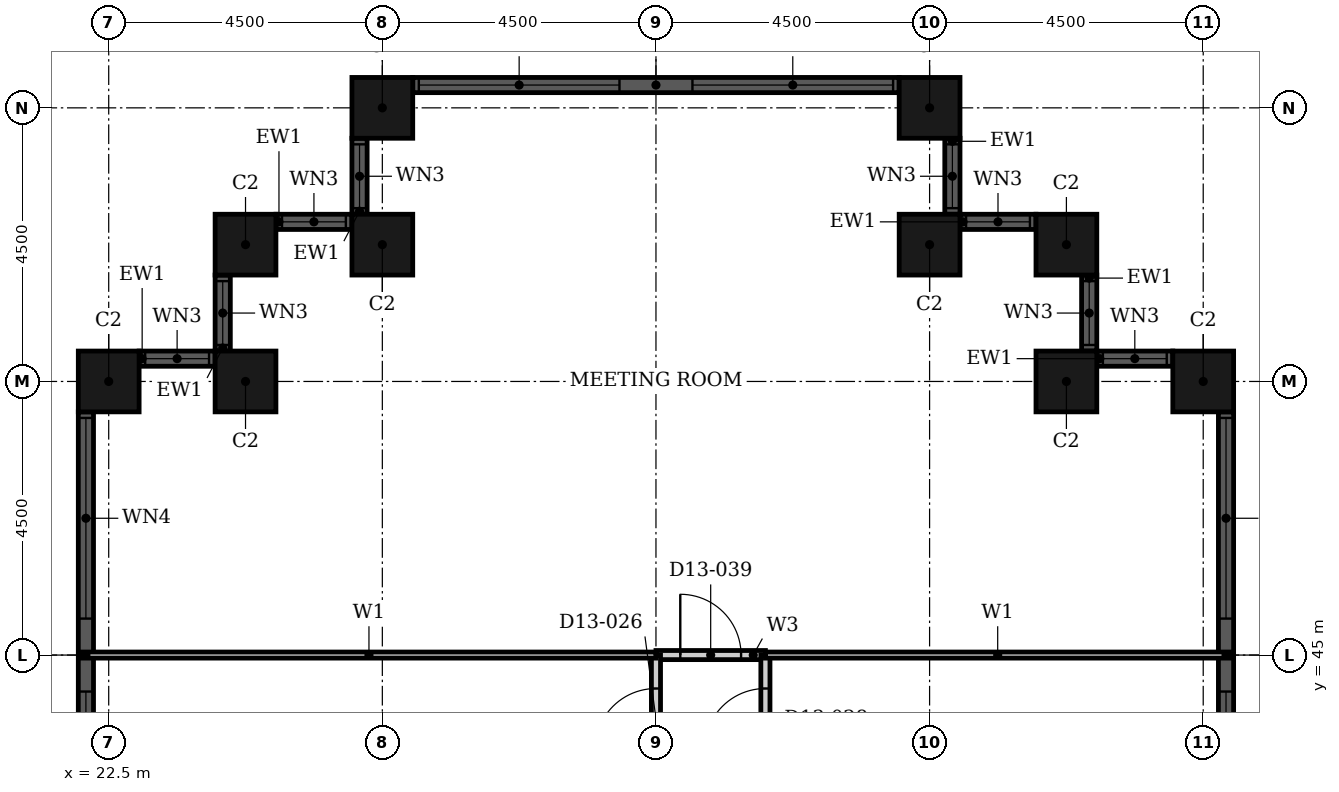
"""IFC4 building model, lengths in metres.
Left out: names, types, materials, properties, quantities, classifications, styles, units other than length and angle.
Written with IfcOpenShell. Run it as: python <this file> out.ifc"""

import sys

from ifc_helpers import new_model, si_unit, direction, frame, frame_2d, origin, origin_2d, place, context, subcontext, project, spatial, rectangle, hollow_rectangle, extrude, element, fill, save


model = new_model("IFC4")
c1 = context("Model", 3, precision=1e-05, world=origin(), true_north=direction((0.0, 1.0)))
c2 = subcontext(c1, "Body", "Model", "MODEL_VIEW")
j1 = project(units=[si_unit("LENGTHUNIT", "METRE"), si_unit("PLANEANGLEUNIT", "RADIAN")], contexts=[c1])
p1 = place(None, origin())
s1 = spatial("IfcSite", under=j1, at=p1, CompositionType="ELEMENT")
p2 = place(p1, origin())
s2 = spatial("IfcBuilding", under=s1, at=p2, CompositionType="ELEMENT")
p3 = place(p2, frame((0.0, 0.0, 60.0)))
s3 = spatial("IfcBuildingStorey", under=s2, at=p3, CompositionType="ELEMENT", Elevation=60.0)
for number, where, z_axis, x_axis in (
    (1, (40.5, 49.5, 0.0), (0.0, 0.0, 1.0), (1.0, 0.0, 0.0)),
    (2, (38.25, 49.5, 0.0), (0.0, 0.0, 1.0), (1.0, 0.0, 0.0)),
    (3, (38.25, 51.75, 0.0), (0.0, 0.0, 1.0), (1.0, 0.0, 0.0)),
    (4, (36.0, 51.75, 0.0), (0.0, 0.0, 1.0), (1.0, 0.0, 0.0)),
    (5, (36.0, 54.0, 0.0), (0.0, 0.0, 1.0), (1.0, 0.0, 0.0)),
    (6, (27.0, 54.0, 0.0), (0.0, 0.0, 1.0), (1.0, 0.0, 0.0)),
    (7, (27.0, 51.75, 0.0), (0.0, 0.0, 1.0), (1.0, 0.0, 0.0)),
    (8, (24.75, 51.75, 0.0), (0.0, 0.0, 1.0), (1.0, 0.0, 0.0)),
    (9, (24.75, 49.5, 0.0), (0.0, 0.0, 1.0), (1.0, 0.0, 0.0)),
    (10, (22.5, 49.5, 0.0), (0.0, 0.0, 1.0), (1.0, 0.0, 0.0)),
):
    element("IfcColumn", number, at=place(p3, frame(where, z_axis=z_axis, x_axis=x_axis)), inside=s3, PredefinedType="COLUMN", context=c2, shape_type="SweptSolid", body=[
        extrude(hollow_rectangle(XDim=1.0, YDim=1.0, WallThickness=0.032, at=origin_2d()), origin(), (0.0, 0.0, 1.0), 3.6),
    ])
p4 = place(p3, frame((40.875, 41.0, 0.0), z_axis=(0.0, 0.0, 1.0), x_axis=(0.0, 1.0, 0.0)))
e11 = element("IfcWall", 11, at=p4, inside=s3, PredefinedType="SOLIDWALL", context=c2, shape_type="SweptSolid", body=[
    extrude(rectangle(XDim=8.0, YDim=0.25, at=frame_2d((4.0, 0.0))), origin(), (0.0, 0.0, 1.0), 3.6),
])
p5 = place(p4, frame((0.1, 0.0, 0.9)))
e12 = element("IfcOpeningElement", 12, at=p5, cuts=e11, PredefinedType="OPENING", context=c2, shape_type="SweptSolid", body=[
    extrude(rectangle(XDim=3.3, YDim=2.08, at=frame_2d((1.65, 1.04))), frame((0.0, 0.135, 0.0), z_axis=(0.0, -1.0, 0.0), x_axis=(1.0, 0.0, 0.0)), (0.0, 0.0, 1.0), 0.27),
])
p6 = place(p4, frame((4.6, 0.0, 0.9)))
e13 = element("IfcOpeningElement", 13, at=p6, cuts=e11, PredefinedType="OPENING", context=c2, shape_type="SweptSolid", body=[
    extrude(rectangle(XDim=3.3, YDim=2.08, at=frame_2d((1.65, 1.04))), frame((0.0, 0.135, 0.0), z_axis=(0.0, -1.0, 0.0), x_axis=(1.0, 0.0, 0.0)), (0.0, 0.0, 1.0), 0.27),
])
p7 = place(p3, frame((40.0, 49.875, 0.0), z_axis=(0.0, 0.0, 1.0), x_axis=(-1.0, 0.0, 0.0)))
e14 = element("IfcWall", 14, at=p7, inside=s3, PredefinedType="SOLIDWALL", context=c2, shape_type="SweptSolid", body=[
    extrude(rectangle(XDim=1.25, YDim=0.25, at=frame_2d((0.625, 0.0))), origin(), (0.0, 0.0, 1.0), 3.6),
])
p8 = place(p7, frame((0.1, 0.0, 0.9)))
e15 = element("IfcOpeningElement", 15, at=p8, cuts=e14, PredefinedType="OPENING", context=c2, shape_type="SweptSolid", body=[
    extrude(rectangle(XDim=1.05, YDim=2.08, at=frame_2d((0.525, 1.04))), frame((0.0, 0.135, 0.0), z_axis=(0.0, -1.0, 0.0), x_axis=(1.0, 0.0, 0.0)), (0.0, 0.0, 1.0), 0.27),
])
p9 = place(p3, frame((38.625, 50.0, 0.0), z_axis=(0.0, 0.0, 1.0), x_axis=(0.0, 1.0, 0.0)))
e16 = element("IfcWall", 16, at=p9, inside=s3, PredefinedType="SOLIDWALL", context=c2, shape_type="SweptSolid", body=[
    extrude(rectangle(XDim=1.25, YDim=0.25, at=frame_2d((0.625, 0.0))), origin(), (0.0, 0.0, 1.0), 3.6),
])
p10 = place(p9, frame((0.1, 0.0, 0.9)))
e17 = element("IfcOpeningElement", 17, at=p10, cuts=e16, PredefinedType="OPENING", context=c2, shape_type="SweptSolid", body=[
    extrude(rectangle(XDim=1.05, YDim=2.08, at=frame_2d((0.525, 1.04))), frame((0.0, 0.135, 0.0), z_axis=(0.0, -1.0, 0.0), x_axis=(1.0, 0.0, 0.0)), (0.0, 0.0, 1.0), 0.27),
])
p11 = place(p3, frame((37.75, 52.125, 0.0), z_axis=(0.0, 0.0, 1.0), x_axis=(-1.0, 0.0, 0.0)))
e18 = element("IfcWall", 18, at=p11, inside=s3, PredefinedType="SOLIDWALL", context=c2, shape_type="SweptSolid", body=[
    extrude(rectangle(XDim=1.25, YDim=0.25, at=frame_2d((0.625, 0.0))), origin(), (0.0, 0.0, 1.0), 3.6),
])
p12 = place(p11, frame((0.1, 0.0, 0.9)))
e19 = element("IfcOpeningElement", 19, at=p12, cuts=e18, PredefinedType="OPENING", context=c2, shape_type="SweptSolid", body=[
    extrude(rectangle(XDim=1.05, YDim=2.08, at=frame_2d((0.525, 1.04))), frame((0.0, 0.135, 0.0), z_axis=(0.0, -1.0, 0.0), x_axis=(1.0, 0.0, 0.0)), (0.0, 0.0, 1.0), 0.27),
])
p13 = place(p3, frame((36.375, 52.25, 0.0), z_axis=(0.0, 0.0, 1.0), x_axis=(0.0, 1.0, 0.0)))
e20 = element("IfcWall", 20, at=p13, inside=s3, PredefinedType="SOLIDWALL", context=c2, shape_type="SweptSolid", body=[
    extrude(rectangle(XDim=1.25, YDim=0.25, at=frame_2d((0.625, 0.0))), origin(), (0.0, 0.0, 1.0), 3.6),
])
p14 = place(p13, frame((0.1, 0.0, 0.9)))
e21 = element("IfcOpeningElement", 21, at=p14, cuts=e20, PredefinedType="OPENING", context=c2, shape_type="SweptSolid", body=[
    extrude(rectangle(XDim=1.05, YDim=2.08, at=frame_2d((0.525, 1.04))), frame((0.0, 0.135, 0.0), z_axis=(0.0, -1.0, 0.0), x_axis=(1.0, 0.0, 0.0)), (0.0, 0.0, 1.0), 0.27),
])
p15 = place(p3, frame((35.5, 54.375, 0.0), z_axis=(0.0, 0.0, 1.0), x_axis=(-1.0, 0.0, 0.0)))
e22 = element("IfcWall", 22, at=p15, inside=s3, PredefinedType="SOLIDWALL", context=c2, shape_type="SweptSolid", body=[
    extrude(rectangle(XDim=8.0, YDim=0.25, at=frame_2d((4.0, 0.0))), origin(), (0.0, 0.0, 1.0), 3.6),
])
p16 = place(p15, frame((0.1, 0.0, 0.9)))
e23 = element("IfcOpeningElement", 23, at=p16, cuts=e22, PredefinedType="OPENING", context=c2, shape_type="SweptSolid", body=[
    extrude(rectangle(XDim=3.3, YDim=2.08, at=frame_2d((1.65, 1.04))), frame((0.0, 0.135, 0.0), z_axis=(0.0, -1.0, 0.0), x_axis=(1.0, 0.0, 0.0)), (0.0, 0.0, 1.0), 0.27),
])
p17 = place(p15, frame((4.6, 0.0, 0.9)))
e24 = element("IfcOpeningElement", 24, at=p17, cuts=e22, PredefinedType="OPENING", context=c2, shape_type="SweptSolid", body=[
    extrude(rectangle(XDim=3.3, YDim=2.08, at=frame_2d((1.65, 1.04))), frame((0.0, 0.135, 0.0), z_axis=(0.0, -1.0, 0.0), x_axis=(1.0, 0.0, 0.0)), (0.0, 0.0, 1.0), 0.27),
])
p18 = place(p3, frame((26.625, 53.5, 0.0), z_axis=(0.0, 0.0, 1.0), x_axis=(0.0, -1.0, 0.0)))
e25 = element("IfcWall", 25, at=p18, inside=s3, PredefinedType="SOLIDWALL", context=c2, shape_type="SweptSolid", body=[
    extrude(rectangle(XDim=1.25, YDim=0.25, at=frame_2d((0.625, 0.0))), origin(), (0.0, 0.0, 1.0), 3.6),
])
p19 = place(p18, frame((0.1, 0.0, 0.9)))
e26 = element("IfcOpeningElement", 26, at=p19, cuts=e25, PredefinedType="OPENING", context=c2, shape_type="SweptSolid", body=[
    extrude(rectangle(XDim=1.05, YDim=2.08, at=frame_2d((0.525, 1.04))), frame((0.0, 0.135, 0.0), z_axis=(0.0, -1.0, 0.0), x_axis=(1.0, 0.0, 0.0)), (0.0, 0.0, 1.0), 0.27),
])
p20 = place(p3, frame((26.5, 52.125, 0.0), z_axis=(0.0, 0.0, 1.0), x_axis=(-1.0, 0.0, 0.0)))
e27 = element("IfcWall", 27, at=p20, inside=s3, PredefinedType="SOLIDWALL", context=c2, shape_type="SweptSolid", body=[
    extrude(rectangle(XDim=1.25, YDim=0.25, at=frame_2d((0.625, 0.0))), origin(), (0.0, 0.0, 1.0), 3.6),
])
p21 = place(p20, frame((0.1, 0.0, 0.9)))
e28 = element("IfcOpeningElement", 28, at=p21, cuts=e27, PredefinedType="OPENING", context=c2, shape_type="SweptSolid", body=[
    extrude(rectangle(XDim=1.05, YDim=2.08, at=frame_2d((0.525, 1.04))), frame((0.0, 0.135, 0.0), z_axis=(0.0, -1.0, 0.0), x_axis=(1.0, 0.0, 0.0)), (0.0, 0.0, 1.0), 0.27),
])
p22 = place(p3, frame((24.375, 51.25, 0.0), z_axis=(0.0, 0.0, 1.0), x_axis=(0.0, -1.0, 0.0)))
e29 = element("IfcWall", 29, at=p22, inside=s3, PredefinedType="SOLIDWALL", context=c2, shape_type="SweptSolid", body=[
    extrude(rectangle(XDim=1.25, YDim=0.25, at=frame_2d((0.625, 0.0))), origin(), (0.0, 0.0, 1.0), 3.6),
])
p23 = place(p22, frame((0.1, 0.0, 0.9)))
e30 = element("IfcOpeningElement", 30, at=p23, cuts=e29, PredefinedType="OPENING", context=c2, shape_type="SweptSolid", body=[
    extrude(rectangle(XDim=1.05, YDim=2.08, at=frame_2d((0.525, 1.04))), frame((0.0, 0.135, 0.0), z_axis=(0.0, -1.0, 0.0), x_axis=(1.0, 0.0, 0.0)), (0.0, 0.0, 1.0), 0.27),
])
p24 = place(p3, frame((24.25, 49.875, 0.0), z_axis=(0.0, 0.0, 1.0), x_axis=(-1.0, 0.0, 0.0)))
e31 = element("IfcWall", 31, at=p24, inside=s3, PredefinedType="SOLIDWALL", context=c2, shape_type="SweptSolid", body=[
    extrude(rectangle(XDim=1.25, YDim=0.25, at=frame_2d((0.625, 0.0))), origin(), (0.0, 0.0, 1.0), 3.6),
])
p25 = place(p24, frame((0.1, 0.0, 0.9)))
e32 = element("IfcOpeningElement", 32, at=p25, cuts=e31, PredefinedType="OPENING", context=c2, shape_type="SweptSolid", body=[
    extrude(rectangle(XDim=1.05, YDim=2.08, at=frame_2d((0.525, 1.04))), frame((0.0, 0.135, 0.0), z_axis=(0.0, -1.0, 0.0), x_axis=(1.0, 0.0, 0.0)), (0.0, 0.0, 1.0), 0.27),
])
p26 = place(p3, frame((22.125, 49.0, 0.0), z_axis=(0.0, 0.0, 1.0), x_axis=(0.0, -1.0, 0.0)))
e33 = element("IfcWall", 33, at=p26, inside=s3, PredefinedType="SOLIDWALL", context=c2, shape_type="SweptSolid", body=[
    extrude(rectangle(XDim=8.0, YDim=0.25, at=frame_2d((4.0, 0.0))), origin(), (0.0, 0.0, 1.0), 3.6),
])
p27 = place(p26, frame((0.1, 0.0, 0.9)))
e34 = element("IfcOpeningElement", 34, at=p27, cuts=e33, PredefinedType="OPENING", context=c2, shape_type="SweptSolid", body=[
    extrude(rectangle(XDim=3.3, YDim=2.08, at=frame_2d((1.65, 1.04))), frame((0.0, 0.135, 0.0), z_axis=(0.0, -1.0, 0.0), x_axis=(1.0, 0.0, 0.0)), (0.0, 0.0, 1.0), 0.27),
])
p28 = place(p26, frame((4.6, 0.0, 0.9)))
e35 = element("IfcOpeningElement", 35, at=p28, cuts=e33, PredefinedType="OPENING", context=c2, shape_type="SweptSolid", body=[
    extrude(rectangle(XDim=3.3, YDim=2.08, at=frame_2d((1.65, 1.04))), frame((0.0, 0.135, 0.0), z_axis=(0.0, -1.0, 0.0), x_axis=(1.0, 0.0, 0.0)), (0.0, 0.0, 1.0), 0.27),
])
p29 = place(p3, frame((31.5, 45.0, 0.0), z_axis=(0.0, 0.0, 1.0), x_axis=(1.0, 0.0, 0.0)))
e36 = element("IfcWall", 36, at=p29, inside=s3, PredefinedType="PARTITIONING", context=c2, shape_type="SweptSolid", body=[
    extrude(rectangle(XDim=1.8, YDim=0.15, at=frame_2d((0.9, 0.0))), origin(), (0.0, 0.0, 1.0), 3.3),
])
p30 = place(p29, frame((0.4, 0.0, 0.0)))
e37 = element("IfcOpeningElement", 37, at=p30, cuts=e36, PredefinedType="OPENING", context=c2, shape_type="SweptSolid", body=[
    extrude(rectangle(XDim=1.0, YDim=2.1, at=frame_2d((0.5, 1.05))), frame((0.0, 0.085, 0.0), z_axis=(0.0, -1.0, 0.0), x_axis=(1.0, 0.0, 0.0)), (0.0, 0.0, 1.0), 0.17),
])
p31 = place(p3, frame((31.5, 33.3, 0.0), z_axis=(0.0, 0.0, 1.0), x_axis=(0.0, 1.0, 0.0)))
e38 = element("IfcWall", 38, at=p31, inside=s3, PredefinedType="PARTITIONING", context=c2, shape_type="SweptSolid", body=[
    extrude(rectangle(XDim=11.7, YDim=0.15, at=frame_2d((5.85, 0.0))), origin(), (0.0, 0.0, 1.0), 2.58),
])
p32 = place(p31, frame((10.15, 0.0, 0.0)))
e39 = element("IfcOpeningElement", 39, at=p32, cuts=e38, PredefinedType="OPENING", context=c2, shape_type="SweptSolid", body=[
    extrude(rectangle(XDim=1.0, YDim=2.1, at=frame_2d((0.5, 1.05))), frame((0.0, 0.085, 0.0), z_axis=(0.0, -1.0, 0.0), x_axis=(1.0, 0.0, 0.0)), (0.0, 0.0, 1.0), 0.17),
])
p33 = place(p3, frame((33.3, 33.3, 0.0), z_axis=(0.0, 0.0, 1.0), x_axis=(0.0, 1.0, 0.0)))
e40 = element("IfcWall", 40, at=p33, inside=s3, PredefinedType="PARTITIONING", context=c2, shape_type="SweptSolid", body=[
    extrude(rectangle(XDim=11.7, YDim=0.15, at=frame_2d((5.85, 0.0))), origin(), (0.0, 0.0, 1.0), 3.3),
])
p34 = place(p33, frame((10.15, 0.0, 0.0)))
e41 = element("IfcOpeningElement", 41, at=p34, cuts=e40, PredefinedType="OPENING", context=c2, shape_type="SweptSolid", body=[
    extrude(rectangle(XDim=1.0, YDim=2.1, at=frame_2d((0.5, 1.05))), frame((0.0, 0.085, 0.0), z_axis=(0.0, -1.0, 0.0), x_axis=(1.0, 0.0, 0.0)), (0.0, 0.0, 1.0), 0.17),
])
p35 = place(p3, frame((33.3, 45.0, 0.0), z_axis=(0.0, 0.0, 1.0), x_axis=(1.0, 0.0, 0.0)))
e42 = element("IfcWall", 42, at=p35, inside=s3, PredefinedType="PARTITIONING", context=c2, shape_type="SweptSolid", body=[
    extrude(rectangle(XDim=7.64, YDim=0.1, at=frame_2d((3.82, 0.0))), origin(), (0.0, 0.0, 1.0), 3.3),
])
p36 = place(p3, frame((22.06, 45.0, 0.0), z_axis=(0.0, 0.0, 1.0), x_axis=(1.0, 0.0, 0.0)))
e43 = element("IfcWall", 43, at=p36, inside=s3, PredefinedType="PARTITIONING", context=c2, shape_type="SweptSolid", body=[
    extrude(rectangle(XDim=9.44, YDim=0.1, at=frame_2d((4.72, 0.0))), origin(), (0.0, 0.0, 1.0), 3.3),
])
p37 = place(p5, origin())
e44 = element("IfcWindow", 44, at=p37, inside=s3, PartitioningType="SINGLE_PANEL", PredefinedType="WINDOW", context=c2, shape_type="SweptSolid", body=[
    extrude(rectangle(XDim=3.3, YDim=2.08, at=frame_2d((1.65, 1.04))), frame((0.0, 0.03, 0.0), z_axis=(0.0, -1.0, 0.0), x_axis=(1.0, 0.0, 0.0)), (0.0, 0.0, 1.0), 0.06),
])
fill(e12, e44)
p38 = place(p6, origin())
e45 = element("IfcWindow", 45, at=p38, inside=s3, PartitioningType="SINGLE_PANEL", PredefinedType="WINDOW", context=c2, shape_type="SweptSolid", body=[
    extrude(rectangle(XDim=3.3, YDim=2.08, at=frame_2d((1.65, 1.04))), frame((0.0, 0.03, 0.0), z_axis=(0.0, -1.0, 0.0), x_axis=(1.0, 0.0, 0.0)), (0.0, 0.0, 1.0), 0.06),
])
fill(e13, e45)
p39 = place(p8, origin())
e46 = element("IfcWindow", 46, at=p39, inside=s3, PartitioningType="SINGLE_PANEL", PredefinedType="WINDOW", context=c2, shape_type="SweptSolid", body=[
    extrude(rectangle(XDim=1.05, YDim=2.08, at=frame_2d((0.525, 1.04))), frame((0.0, 0.03, 0.0), z_axis=(0.0, -1.0, 0.0), x_axis=(1.0, 0.0, 0.0)), (0.0, 0.0, 1.0), 0.06),
])
fill(e15, e46)
p40 = place(p10, origin())
e47 = element("IfcWindow", 47, at=p40, inside=s3, PartitioningType="SINGLE_PANEL", PredefinedType="WINDOW", context=c2, shape_type="SweptSolid", body=[
    extrude(rectangle(XDim=1.05, YDim=2.08, at=frame_2d((0.525, 1.04))), frame((0.0, 0.03, 0.0), z_axis=(0.0, -1.0, 0.0), x_axis=(1.0, 0.0, 0.0)), (0.0, 0.0, 1.0), 0.06),
])
fill(e17, e47)
p41 = place(p12, origin())
e48 = element("IfcWindow", 48, at=p41, inside=s3, PartitioningType="SINGLE_PANEL", PredefinedType="WINDOW", context=c2, shape_type="SweptSolid", body=[
    extrude(rectangle(XDim=1.05, YDim=2.08, at=frame_2d((0.525, 1.04))), frame((0.0, 0.03, 0.0), z_axis=(0.0, -1.0, 0.0), x_axis=(1.0, 0.0, 0.0)), (0.0, 0.0, 1.0), 0.06),
])
fill(e19, e48)
p42 = place(p14, origin())
e49 = element("IfcWindow", 49, at=p42, inside=s3, PartitioningType="SINGLE_PANEL", PredefinedType="WINDOW", context=c2, shape_type="SweptSolid", body=[
    extrude(rectangle(XDim=1.05, YDim=2.08, at=frame_2d((0.525, 1.04))), frame((0.0, 0.03, 0.0), z_axis=(0.0, -1.0, 0.0), x_axis=(1.0, 0.0, 0.0)), (0.0, 0.0, 1.0), 0.06),
])
fill(e21, e49)
p43 = place(p16, origin())
e50 = element("IfcWindow", 50, at=p43, inside=s3, PartitioningType="SINGLE_PANEL", PredefinedType="WINDOW", context=c2, shape_type="SweptSolid", body=[
    extrude(rectangle(XDim=3.3, YDim=2.08, at=frame_2d((1.65, 1.04))), frame((0.0, 0.03, 0.0), z_axis=(0.0, -1.0, 0.0), x_axis=(1.0, 0.0, 0.0)), (0.0, 0.0, 1.0), 0.06),
])
fill(e23, e50)
p44 = place(p17, origin())
e51 = element("IfcWindow", 51, at=p44, inside=s3, PartitioningType="SINGLE_PANEL", PredefinedType="WINDOW", context=c2, shape_type="SweptSolid", body=[
    extrude(rectangle(XDim=3.3, YDim=2.08, at=frame_2d((1.65, 1.04))), frame((0.0, 0.03, 0.0), z_axis=(0.0, -1.0, 0.0), x_axis=(1.0, 0.0, 0.0)), (0.0, 0.0, 1.0), 0.06),
])
fill(e24, e51)
p45 = place(p19, origin())
e52 = element("IfcWindow", 52, at=p45, inside=s3, PartitioningType="SINGLE_PANEL", PredefinedType="WINDOW", context=c2, shape_type="SweptSolid", body=[
    extrude(rectangle(XDim=1.05, YDim=2.08, at=frame_2d((0.525, 1.04))), frame((0.0, 0.03, 0.0), z_axis=(0.0, -1.0, 0.0), x_axis=(1.0, 0.0, 0.0)), (0.0, 0.0, 1.0), 0.06),
])
fill(e26, e52)
p46 = place(p21, origin())
e53 = element("IfcWindow", 53, at=p46, inside=s3, PartitioningType="SINGLE_PANEL", PredefinedType="WINDOW", context=c2, shape_type="SweptSolid", body=[
    extrude(rectangle(XDim=1.05, YDim=2.08, at=frame_2d((0.525, 1.04))), frame((0.0, 0.03, 0.0), z_axis=(0.0, -1.0, 0.0), x_axis=(1.0, 0.0, 0.0)), (0.0, 0.0, 1.0), 0.06),
])
fill(e28, e53)
p47 = place(p23, origin())
e54 = element("IfcWindow", 54, at=p47, inside=s3, PartitioningType="SINGLE_PANEL", PredefinedType="WINDOW", context=c2, shape_type="SweptSolid", body=[
    extrude(rectangle(XDim=1.05, YDim=2.08, at=frame_2d((0.525, 1.04))), frame((0.0, 0.03, 0.0), z_axis=(0.0, -1.0, 0.0), x_axis=(1.0, 0.0, 0.0)), (0.0, 0.0, 1.0), 0.06),
])
fill(e30, e54)
p48 = place(p25, origin())
e55 = element("IfcWindow", 55, at=p48, inside=s3, PartitioningType="SINGLE_PANEL", PredefinedType="WINDOW", context=c2, shape_type="SweptSolid", body=[
    extrude(rectangle(XDim=1.05, YDim=2.08, at=frame_2d((0.525, 1.04))), frame((0.0, 0.03, 0.0), z_axis=(0.0, -1.0, 0.0), x_axis=(1.0, 0.0, 0.0)), (0.0, 0.0, 1.0), 0.06),
])
fill(e32, e55)
p49 = place(p27, origin())
e56 = element("IfcWindow", 56, at=p49, inside=s3, PartitioningType="SINGLE_PANEL", PredefinedType="WINDOW", context=c2, shape_type="SweptSolid", body=[
    extrude(rectangle(XDim=3.3, YDim=2.08, at=frame_2d((1.65, 1.04))), frame((0.0, 0.03, 0.0), z_axis=(0.0, -1.0, 0.0), x_axis=(1.0, 0.0, 0.0)), (0.0, 0.0, 1.0), 0.06),
])
fill(e34, e56)
p50 = place(p28, origin())
e57 = element("IfcWindow", 57, at=p50, inside=s3, PartitioningType="SINGLE_PANEL", PredefinedType="WINDOW", context=c2, shape_type="SweptSolid", body=[
    extrude(rectangle(XDim=3.3, YDim=2.08, at=frame_2d((1.65, 1.04))), frame((0.0, 0.03, 0.0), z_axis=(0.0, -1.0, 0.0), x_axis=(1.0, 0.0, 0.0)), (0.0, 0.0, 1.0), 0.06),
])
fill(e35, e57)
p51 = place(p32, origin())
e58 = element("IfcDoor", 58, at=p51, inside=s3, OperationType="SINGLE_SWING_RIGHT", PredefinedType="DOOR", context=c2, shape_type="SweptSolid", body=[
    extrude(rectangle(XDim=1.0, YDim=2.1, at=frame_2d((0.5, 1.05))), frame((0.0, 0.025, 0.0), z_axis=(0.0, -1.0, 0.0), x_axis=(1.0, 0.0, 0.0)), (0.0, 0.0, 1.0), 0.05),
])
fill(e39, e58)
p52 = place(p34, origin())
e59 = element("IfcDoor", 59, at=p52, inside=s3, OperationType="SINGLE_SWING_RIGHT", PredefinedType="DOOR", context=c2, shape_type="SweptSolid", body=[
    extrude(rectangle(XDim=1.0, YDim=2.1, at=frame_2d((0.5, 1.05))), frame((0.0, 0.025, 0.0), z_axis=(0.0, -1.0, 0.0), x_axis=(1.0, 0.0, 0.0)), (0.0, 0.0, 1.0), 0.05),
])
fill(e41, e59)
p53 = place(p30, origin())
e60 = element("IfcDoor", 60, at=p53, inside=s3, OperationType="SINGLE_SWING_RIGHT", PredefinedType="DOOR", context=c2, shape_type="SweptSolid", body=[
    extrude(rectangle(XDim=1.0, YDim=2.1, at=frame_2d((0.5, 1.05))), frame((0.0, 0.025, 0.0), z_axis=(0.0, -1.0, 0.0), x_axis=(1.0, 0.0, 0.0)), (0.0, 0.0, 1.0), 0.05),
])
fill(e37, e60)
save(model, sys.argv[1])
